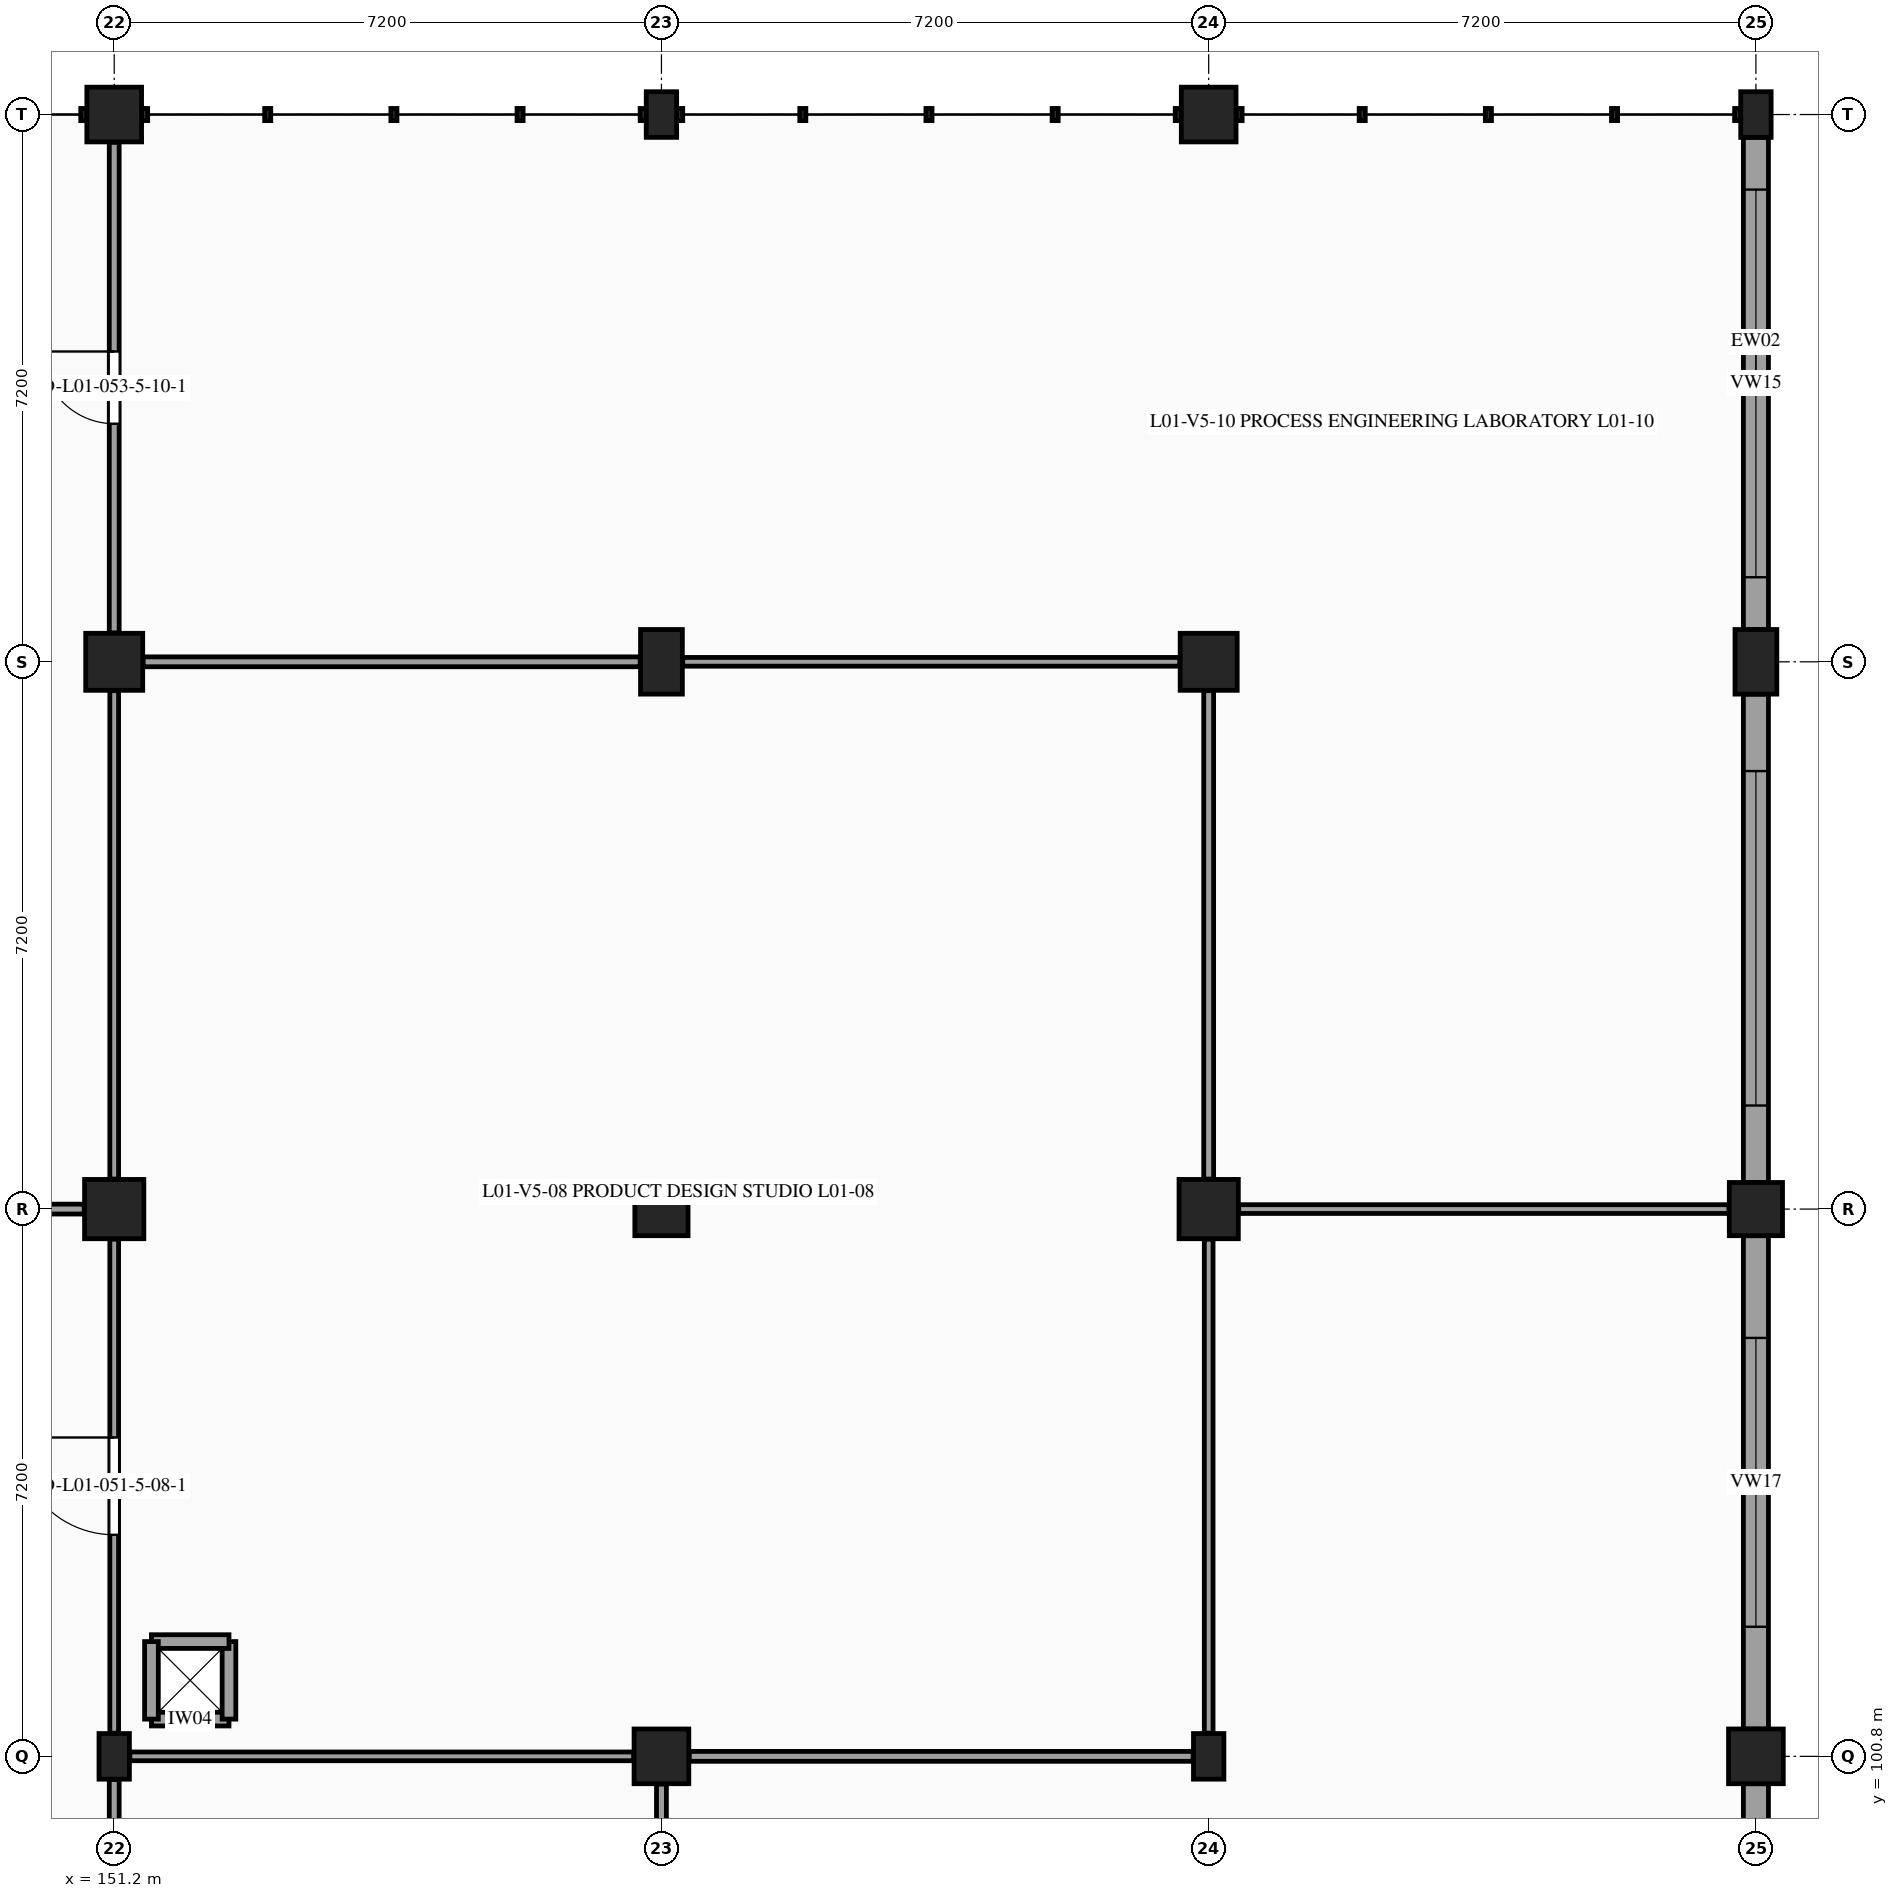
"""IFC4 building model, lengths in metres.
Left out: names, types, materials, properties, quantities, classifications, styles, units other than length and angle.
Written with IfcOpenShell. Run it as: python <this file> out.ifc"""

import sys

from ifc_helpers import new_model, si_unit, direction, frame, frame_2d, origin, origin_2d, place, context, subcontext, project, spatial, rectangle, extrude, element, fill, save


model = new_model("IFC4")
c1 = context("Model", 3, precision=1e-05, world=origin(), true_north=direction((0.0, 1.0)))
c2 = subcontext(c1, "Body", "Model", "MODEL_VIEW")
j1 = project(units=[si_unit("LENGTHUNIT", "METRE"), si_unit("PLANEANGLEUNIT", "RADIAN")], contexts=[c1])
p1 = place(None, origin())
s1 = spatial("IfcSite", under=j1, at=p1, CompositionType="ELEMENT")
p2 = place(p1, origin())
s2 = spatial("IfcBuilding", under=s1, at=p2, CompositionType="ELEMENT")
p3 = place(p2, frame((0.0, 0.0, 5.4)))
s3 = spatial("IfcBuildingStorey", under=s2, at=p3, CompositionType="ELEMENT", Elevation=5.4)
p4 = place(p3, frame((151.2, 100.8, 0.0), z_axis=(0.0, 0.0, 1.0), x_axis=(1.0, 0.0, 0.0)))
e1 = element("IfcColumn", 1, at=p4, inside=s3, PredefinedType="PILASTER", context=c2, shape_type="SweptSolid", body=[
    extrude(rectangle(XDim=0.4, YDim=0.6, at=origin_2d()), origin(), (0.0, 0.0, 1.0), 4.5),
])
p5 = place(p3, frame((151.2, 108.0, 0.0), z_axis=(0.0, 0.0, 1.0), x_axis=(1.0, 0.0, 0.0)))
e2 = element("IfcColumn", 2, at=p5, inside=s3, PredefinedType="COLUMN", context=c2, shape_type="SweptSolid", body=[
    extrude(rectangle(XDim=0.78, YDim=0.78, at=origin_2d()), origin(), (0.0, 0.0, 1.0), 4.5),
])
p6 = place(p3, frame((151.2, 115.2, 0.0), z_axis=(0.0, 0.0, 1.0), x_axis=(1.0, 0.0, 0.0)))
e3 = element("IfcColumn", 3, at=p6, inside=s3, PredefinedType="COLUMN", context=c2, shape_type="SweptSolid", body=[
    extrude(rectangle(XDim=0.75, YDim=0.75, at=origin_2d()), origin(), (0.0, 0.0, 1.0), 4.5),
])
for number, where, z_axis, x_axis in (
    (4, (151.2, 122.4, 0.0), (0.0, 0.0, 1.0), (1.0, 0.0, 0.0)),
    (5, (158.4, 100.8, 0.0), (0.0, 0.0, 1.0), (1.0, 0.0, 0.0)),
):
    element("IfcColumn", number, at=place(p3, frame(where, z_axis=z_axis, x_axis=x_axis)), inside=s3, PredefinedType="COLUMN", context=c2, shape_type="SweptSolid", body=[
        extrude(rectangle(XDim=0.72, YDim=0.72, at=origin_2d()), origin(), (0.0, 0.0, 1.0), 4.5),
    ])
p7 = place(p3, frame((158.4, 108.0, 0.0), z_axis=(0.0, 0.0, 1.0), x_axis=(1.0, 0.0, 0.0)))
e6 = element("IfcColumn", 6, at=p7, inside=s3, PredefinedType="COLUMN", context=c2, shape_type="SweptSolid", body=[
    extrude(rectangle(XDim=0.7, YDim=0.7, at=origin_2d()), origin(), (0.0, 0.0, 1.0), 4.5),
])
p8 = place(p3, frame((158.4, 115.2, 0.0), z_axis=(0.0, 0.0, 1.0), x_axis=(1.0, 0.0, 0.0)))
e7 = element("IfcColumn", 7, at=p8, inside=s3, PredefinedType="COLUMN", context=c2, shape_type="SweptSolid", body=[
    extrude(rectangle(XDim=0.55, YDim=0.85, at=origin_2d()), origin(), (0.0, 0.0, 1.0), 4.5),
])
for number, where, z_axis, x_axis in (
    (8, (158.4, 122.4, 0.0), (0.0, 0.0, 1.0), (1.0, 0.0, 0.0)),
    (9, (165.6, 100.8, 0.0), (0.0, 0.0, 1.0), (1.0, 0.0, 0.0)),
):
    element("IfcColumn", number, at=place(p3, frame(where, z_axis=z_axis, x_axis=x_axis)), inside=s3, PredefinedType="PILASTER", context=c2, shape_type="SweptSolid", body=[
        extrude(rectangle(XDim=0.4, YDim=0.6, at=origin_2d()), origin(), (0.0, 0.0, 1.0), 4.5),
    ])
p9 = place(p3, frame((165.6, 108.0, 0.0), z_axis=(0.0, 0.0, 1.0), x_axis=(1.0, 0.0, 0.0)))
e10 = element("IfcColumn", 10, at=p9, inside=s3, PredefinedType="COLUMN", context=c2, shape_type="SweptSolid", body=[
    extrude(rectangle(XDim=0.78, YDim=0.78, at=origin_2d()), origin(), (0.0, 0.0, 1.0), 4.5),
])
p10 = place(p3, frame((165.6, 115.2, 0.0), z_axis=(0.0, 0.0, 1.0), x_axis=(1.0, 0.0, 0.0)))
e11 = element("IfcColumn", 11, at=p10, inside=s3, PredefinedType="COLUMN", context=c2, shape_type="SweptSolid", body=[
    extrude(rectangle(XDim=0.75, YDim=0.75, at=origin_2d()), origin(), (0.0, 0.0, 1.0), 4.5),
])
for number, where, z_axis, x_axis in (
    (12, (165.6, 122.4, 0.0), (0.0, 0.0, 1.0), (1.0, 0.0, 0.0)),
    (13, (172.8, 100.8, 0.0), (0.0, 0.0, 1.0), (1.0, 0.0, 0.0)),
):
    element("IfcColumn", number, at=place(p3, frame(where, z_axis=z_axis, x_axis=x_axis)), inside=s3, PredefinedType="COLUMN", context=c2, shape_type="SweptSolid", body=[
        extrude(rectangle(XDim=0.72, YDim=0.72, at=origin_2d()), origin(), (0.0, 0.0, 1.0), 4.5),
    ])
p11 = place(p3, frame((172.8, 108.0, 0.0), z_axis=(0.0, 0.0, 1.0), x_axis=(1.0, 0.0, 0.0)))
e14 = element("IfcColumn", 14, at=p11, inside=s3, PredefinedType="COLUMN", context=c2, shape_type="SweptSolid", body=[
    extrude(rectangle(XDim=0.7, YDim=0.7, at=origin_2d()), origin(), (0.0, 0.0, 1.0), 4.5),
])
p12 = place(p3, frame((172.8, 115.2, 0.0), z_axis=(0.0, 0.0, 1.0), x_axis=(1.0, 0.0, 0.0)))
e15 = element("IfcColumn", 15, at=p12, inside=s3, PredefinedType="COLUMN", context=c2, shape_type="SweptSolid", body=[
    extrude(rectangle(XDim=0.55, YDim=0.85, at=origin_2d()), origin(), (0.0, 0.0, 1.0), 4.5),
])
p13 = place(p3, frame((172.8, 122.4, 0.0), z_axis=(0.0, 0.0, 1.0), x_axis=(1.0, 0.0, 0.0)))
e16 = element("IfcColumn", 16, at=p13, inside=s3, PredefinedType="PILASTER", context=c2, shape_type="SweptSolid", body=[
    extrude(rectangle(XDim=0.4, YDim=0.6, at=origin_2d()), origin(), (0.0, 0.0, 1.0), 4.5),
])
p14 = place(p3, frame((172.8, 122.1, 0.0), z_axis=(0.0, 0.0, 1.0), x_axis=(0.0, -1.0, 0.0)))
e17 = element("IfcWall", 17, at=p14, inside=s3, PredefinedType="STANDARD", context=c2, shape_type="SweptSolid", body=[
    extrude(rectangle(XDim=6.475, YDim=0.33, at=frame_2d((3.238, 0.0))), origin(), (0.0, 0.0, 1.0), 3.455),
])
p15 = place(p14, frame((0.688, 0.0, 0.98)))
e18 = element("IfcOpeningElement", 18, at=p15, cuts=e17, PredefinedType="OPENING", context=c2, shape_type="SweptSolid", body=[
    extrude(rectangle(XDim=5.1, YDim=1.75, at=frame_2d((2.55, 0.875))), frame((0.0, 0.175, 0.0), z_axis=(0.0, -1.0, 0.0), x_axis=(1.0, 0.0, 0.0)), (0.0, 0.0, 1.0), 0.35),
])
p16 = place(p3, frame((172.8, 114.775, 0.0), z_axis=(0.0, 0.0, 1.0), x_axis=(0.0, -1.0, 0.0)))
e19 = element("IfcWall", 19, at=p16, inside=s3, PredefinedType="STANDARD", context=c2, shape_type="SweptSolid", body=[
    extrude(rectangle(XDim=6.425, YDim=0.33, at=frame_2d((3.212, 0.0))), origin(), (0.0, 0.0, 1.0), 3.455),
])
p17 = place(p16, frame((1.012, 0.0, 0.98)))
e20 = element("IfcOpeningElement", 20, at=p17, cuts=e19, PredefinedType="OPENING", context=c2, shape_type="SweptSolid", body=[
    extrude(rectangle(XDim=4.4, YDim=1.65, at=frame_2d((2.2, 0.825))), frame((0.0, 0.175, 0.0), z_axis=(0.0, -1.0, 0.0), x_axis=(1.0, 0.0, 0.0)), (0.0, 0.0, 1.0), 0.35),
])
p18 = place(p3, frame((172.8, 107.65, 0.0), z_axis=(0.0, 0.0, 1.0), x_axis=(0.0, -1.0, 0.0)))
e21 = element("IfcWall", 21, at=p18, inside=s3, PredefinedType="STANDARD", context=c2, shape_type="SweptSolid", body=[
    extrude(rectangle(XDim=6.49, YDim=0.33, at=frame_2d((3.245, 0.0))), origin(), (0.0, 0.0, 1.0), 3.455),
])
p19 = place(p18, frame((1.345, 0.0, 0.98)))
e22 = element("IfcOpeningElement", 22, at=p19, cuts=e21, PredefinedType="OPENING", context=c2, shape_type="SweptSolid", body=[
    extrude(rectangle(XDim=3.8, YDim=1.6, at=frame_2d((1.9, 0.8))), frame((0.0, 0.175, 0.0), z_axis=(0.0, -1.0, 0.0), x_axis=(1.0, 0.0, 0.0)), (0.0, 0.0, 1.0), 0.35),
])
p20 = place(p3, frame((172.8, 100.44, 0.0), z_axis=(0.0, 0.0, 1.0), x_axis=(0.0, -1.0, 0.0)))
e23 = element("IfcWall", 23, at=p20, inside=s3, PredefinedType="STANDARD", context=c2, shape_type="SweptSolid", body=[
    extrude(rectangle(XDim=6.465, YDim=0.33, at=frame_2d((3.232, 0.0))), origin(), (0.0, 0.0, 1.0), 3.455),
])
p21 = place(p20, frame((1.782, 0.0, 0.98)))
e24 = element("IfcOpeningElement", 24, at=p21, cuts=e23, PredefinedType="OPENING", context=c2, shape_type="SweptSolid", body=[
    extrude(rectangle(XDim=2.9, YDim=1.6, at=frame_2d((1.45, 0.8))), frame((0.0, 0.175, 0.0), z_axis=(0.0, -1.0, 0.0), x_axis=(1.0, 0.0, 0.0)), (0.0, 0.0, 1.0), 0.35),
])
for number, where, z_axis, x_axis in (
    (25, (151.69, 101.29, 0.0), (0.0, 0.0, 1.0), (1.0, 0.0, 0.0)),
    (26, (152.71, 101.29, 0.0), (0.0, 0.0, 1.0), (0.0, 1.0, 0.0)),
    (27, (152.71, 102.31, 0.0), (0.0, 0.0, 1.0), (-1.0, 0.0, 0.0)),
    (28, (151.69, 102.31, 0.0), (0.0, 0.0, 1.0), (0.0, -1.0, 0.0)),
):
    element("IfcWall", number, at=place(p3, frame(where, z_axis=z_axis, x_axis=x_axis)), inside=s3, PredefinedType="PARTITIONING", context=c2, shape_type="SweptSolid", body=[
        extrude(rectangle(XDim=1.02, YDim=0.18, at=frame_2d((0.51, 0.0))), origin(), (0.0, 0.0, 1.0), 4.21),
    ])
p22 = place(p3, frame((151.2, 94.03, 0.0), z_axis=(0.0, 0.0, 1.0), x_axis=(0.0, 1.0, 0.0)))
e29 = element("IfcWall", 29, at=p22, inside=s3, PredefinedType="PARTITIONING", context=c2, shape_type="SweptSolid", body=[
    extrude(rectangle(XDim=6.465, YDim=0.13, at=frame_2d((3.232, 0.0))), origin(), (0.0, 0.0, 1.0), 3.575),
])
p23 = place(p3, frame((151.2, 101.105, 0.0), z_axis=(0.0, 0.0, 1.0), x_axis=(0.0, 1.0, 0.0)))
e30 = element("IfcWall", 30, at=p23, inside=s3, PredefinedType="PARTITIONING", context=c2, shape_type="SweptSolid", body=[
    extrude(rectangle(XDim=6.5, YDim=0.115, at=frame_2d((3.25, 0.0))), origin(), (0.0, 0.0, 1.0), 3.525),
])
p24 = place(p23, frame((2.61, 0.0, 0.0)))
e31 = element("IfcOpeningElement", 31, at=p24, cuts=e30, PredefinedType="OPENING", context=c2, shape_type="SweptSolid", body=[
    extrude(rectangle(XDim=1.28, YDim=2.24, at=frame_2d((0.64, 1.12))), frame((0.0, 0.067, 0.0), z_axis=(0.0, -1.0, 0.0), x_axis=(1.0, 0.0, 0.0)), (0.0, 0.0, 1.0), 0.135),
])
p25 = place(p3, frame((144.355, 108.0, 0.0), z_axis=(0.0, 0.0, 1.0), x_axis=(1.0, 0.0, 0.0)))
e32 = element("IfcWall", 32, at=p25, inside=s3, PredefinedType="PARTITIONING", context=c2, shape_type="SweptSolid", body=[
    extrude(rectangle(XDim=6.45, YDim=0.13, at=frame_2d((3.225, 0.0))), origin(), (0.0, 0.0, 1.0), 3.46),
])
p26 = place(p3, frame((151.2, 108.395, 0.0), z_axis=(0.0, 0.0, 1.0), x_axis=(0.0, 1.0, 0.0)))
e33 = element("IfcWall", 33, at=p26, inside=s3, PredefinedType="PARTITIONING", context=c2, shape_type="SweptSolid", body=[
    extrude(rectangle(XDim=6.425, YDim=0.115, at=frame_2d((3.212, 0.0))), origin(), (0.0, 0.0, 1.0), 3.525),
])
p27 = place(p3, frame((151.2, 115.58, 0.0), z_axis=(0.0, 0.0, 1.0), x_axis=(0.0, 1.0, 0.0)))
e34 = element("IfcWall", 34, at=p27, inside=s3, PredefinedType="PARTITIONING", context=c2, shape_type="SweptSolid", body=[
    extrude(rectangle(XDim=6.455, YDim=0.13, at=frame_2d((3.228, 0.0))), origin(), (0.0, 0.0, 1.0), 3.52),
])
p28 = place(p27, frame((2.752, 0.0, 0.0)))
e35 = element("IfcOpeningElement", 35, at=p28, cuts=e34, PredefinedType="OPENING", context=c2, shape_type="SweptSolid", body=[
    extrude(rectangle(XDim=0.95, YDim=2.15, at=frame_2d((0.475, 1.075))), frame((0.0, 0.075, 0.0), z_axis=(0.0, -1.0, 0.0), x_axis=(1.0, 0.0, 0.0)), (0.0, 0.0, 1.0), 0.15),
])
p29 = place(p3, frame((158.4, 93.98, 0.0), z_axis=(0.0, 0.0, 1.0), x_axis=(0.0, 1.0, 0.0)))
e36 = element("IfcWall", 36, at=p29, inside=s3, PredefinedType="PARTITIONING", context=c2, shape_type="SweptSolid", body=[
    extrude(rectangle(XDim=6.455, YDim=0.13, at=frame_2d((3.228, 0.0))), origin(), (0.0, 0.0, 1.0), 3.575),
])
p30 = place(p29, frame((2.637, 0.0, 0.0)))
e37 = element("IfcOpeningElement", 37, at=p30, cuts=e36, PredefinedType="OPENING", context=c2, shape_type="SweptSolid", body=[
    extrude(rectangle(XDim=1.18, YDim=2.18, at=frame_2d((0.59, 1.09))), frame((0.0, 0.075, 0.0), z_axis=(0.0, -1.0, 0.0), x_axis=(1.0, 0.0, 0.0)), (0.0, 0.0, 1.0), 0.15),
])
p31 = place(p3, frame((151.405, 100.8, 0.0), z_axis=(0.0, 0.0, 1.0), x_axis=(1.0, 0.0, 0.0)))
e38 = element("IfcWall", 38, at=p31, inside=s3, PredefinedType="PARTITIONING", context=c2, shape_type="SweptSolid", body=[
    extrude(rectangle(XDim=6.63, YDim=0.115, at=frame_2d((3.315, 0.0))), origin(), (0.0, 0.0, 1.0), 3.47),
])
p32 = place(p3, frame((151.58, 115.2, 0.0), z_axis=(0.0, 0.0, 1.0), x_axis=(1.0, 0.0, 0.0)))
e39 = element("IfcWall", 39, at=p32, inside=s3, PredefinedType="PARTITIONING", context=c2, shape_type="SweptSolid", body=[
    extrude(rectangle(XDim=6.54, YDim=0.13, at=frame_2d((3.27, 0.0))), origin(), (0.0, 0.0, 1.0), 3.47),
])
p33 = place(p3, frame((158.765, 100.8, 0.0), z_axis=(0.0, 0.0, 1.0), x_axis=(1.0, 0.0, 0.0)))
e40 = element("IfcWall", 40, at=p33, inside=s3, PredefinedType="PARTITIONING", context=c2, shape_type="SweptSolid", body=[
    extrude(rectangle(XDim=6.63, YDim=0.13, at=frame_2d((3.315, 0.0))), origin(), (0.0, 0.0, 1.0), 3.485),
])
p34 = place(p3, frame((165.6, 101.105, 0.0), z_axis=(0.0, 0.0, 1.0), x_axis=(0.0, 1.0, 0.0)))
e41 = element("IfcWall", 41, at=p34, inside=s3, PredefinedType="PARTITIONING", context=c2, shape_type="SweptSolid", body=[
    extrude(rectangle(XDim=6.5, YDim=0.115, at=frame_2d((3.25, 0.0))), origin(), (0.0, 0.0, 1.0), 3.525),
])
p35 = place(p3, frame((165.6, 108.395, 0.0), z_axis=(0.0, 0.0, 1.0), x_axis=(0.0, 1.0, 0.0)))
e42 = element("IfcWall", 42, at=p35, inside=s3, PredefinedType="PARTITIONING", context=c2, shape_type="SweptSolid", body=[
    extrude(rectangle(XDim=6.425, YDim=0.13, at=frame_2d((3.212, 0.0))), origin(), (0.0, 0.0, 1.0), 3.525),
])
p36 = place(p3, frame((158.68, 115.2, 0.0), z_axis=(0.0, 0.0, 1.0), x_axis=(1.0, 0.0, 0.0)))
e43 = element("IfcWall", 43, at=p36, inside=s3, PredefinedType="PARTITIONING", context=c2, shape_type="SweptSolid", body=[
    extrude(rectangle(XDim=6.54, YDim=0.115, at=frame_2d((3.27, 0.0))), origin(), (0.0, 0.0, 1.0), 3.485),
])
p37 = place(p3, frame((165.995, 108.0, 0.0), z_axis=(0.0, 0.0, 1.0), x_axis=(1.0, 0.0, 0.0)))
e44 = element("IfcWall", 44, at=p37, inside=s3, PredefinedType="PARTITIONING", context=c2, shape_type="SweptSolid", body=[
    extrude(rectangle(XDim=6.45, YDim=0.115, at=frame_2d((3.225, 0.0))), origin(), (0.0, 0.0, 1.0), 3.49),
])
p38 = place(p15, origin())
e45 = element("IfcWindow", 45, at=p38, inside=s3, PartitioningType="SINGLE_PANEL", PredefinedType="WINDOW", context=c2, shape_type="SweptSolid", body=[
    extrude(rectangle(XDim=5.1, YDim=1.75, at=frame_2d((2.55, 0.875))), frame((0.0, -0.03, 0.0), z_axis=(0.0, -1.0, 0.0), x_axis=(1.0, 0.0, 0.0)), (0.0, 0.0, 1.0), 0.06),
])
fill(e18, e45)
p39 = place(p17, origin())
e46 = element("IfcWindow", 46, at=p39, inside=s3, PartitioningType="SINGLE_PANEL", PredefinedType="WINDOW", context=c2, shape_type="SweptSolid", body=[
    extrude(rectangle(XDim=4.4, YDim=1.65, at=frame_2d((2.2, 0.825))), frame((0.0, -0.03, 0.0), z_axis=(0.0, -1.0, 0.0), x_axis=(1.0, 0.0, 0.0)), (0.0, 0.0, 1.0), 0.06),
])
fill(e20, e46)
p40 = place(p19, origin())
e47 = element("IfcWindow", 47, at=p40, inside=s3, PartitioningType="SINGLE_PANEL", PredefinedType="WINDOW", context=c2, shape_type="SweptSolid", body=[
    extrude(rectangle(XDim=3.8, YDim=1.6, at=frame_2d((1.9, 0.8))), frame((0.0, -0.03, 0.0), z_axis=(0.0, -1.0, 0.0), x_axis=(1.0, 0.0, 0.0)), (0.0, 0.0, 1.0), 0.06),
])
fill(e22, e47)
p41 = place(p24, origin())
e48 = element("IfcDoor", 48, at=p41, inside=s3, OperationType="SINGLE_SWING_RIGHT", PredefinedType="DOOR", context=c2, shape_type="SweptSolid", body=[
    extrude(rectangle(XDim=1.28, YDim=2.24, at=frame_2d((0.64, 1.12))), frame((0.0, 0.025, 0.0), z_axis=(0.0, -1.0, 0.0), x_axis=(1.0, 0.0, 0.0)), (0.0, 0.0, 1.0), 0.05),
])
fill(e31, e48)
p42 = place(p28, origin())
e49 = element("IfcDoor", 49, at=p42, inside=s3, OperationType="SINGLE_SWING_RIGHT", PredefinedType="DOOR", context=c2, shape_type="SweptSolid", body=[
    extrude(rectangle(XDim=0.95, YDim=2.15, at=frame_2d((0.475, 1.075))), frame((0.0, 0.025, 0.0), z_axis=(0.0, -1.0, 0.0), x_axis=(1.0, 0.0, 0.0)), (0.0, 0.0, 1.0), 0.05),
])
fill(e35, e49)
save(model, sys.argv[1])
